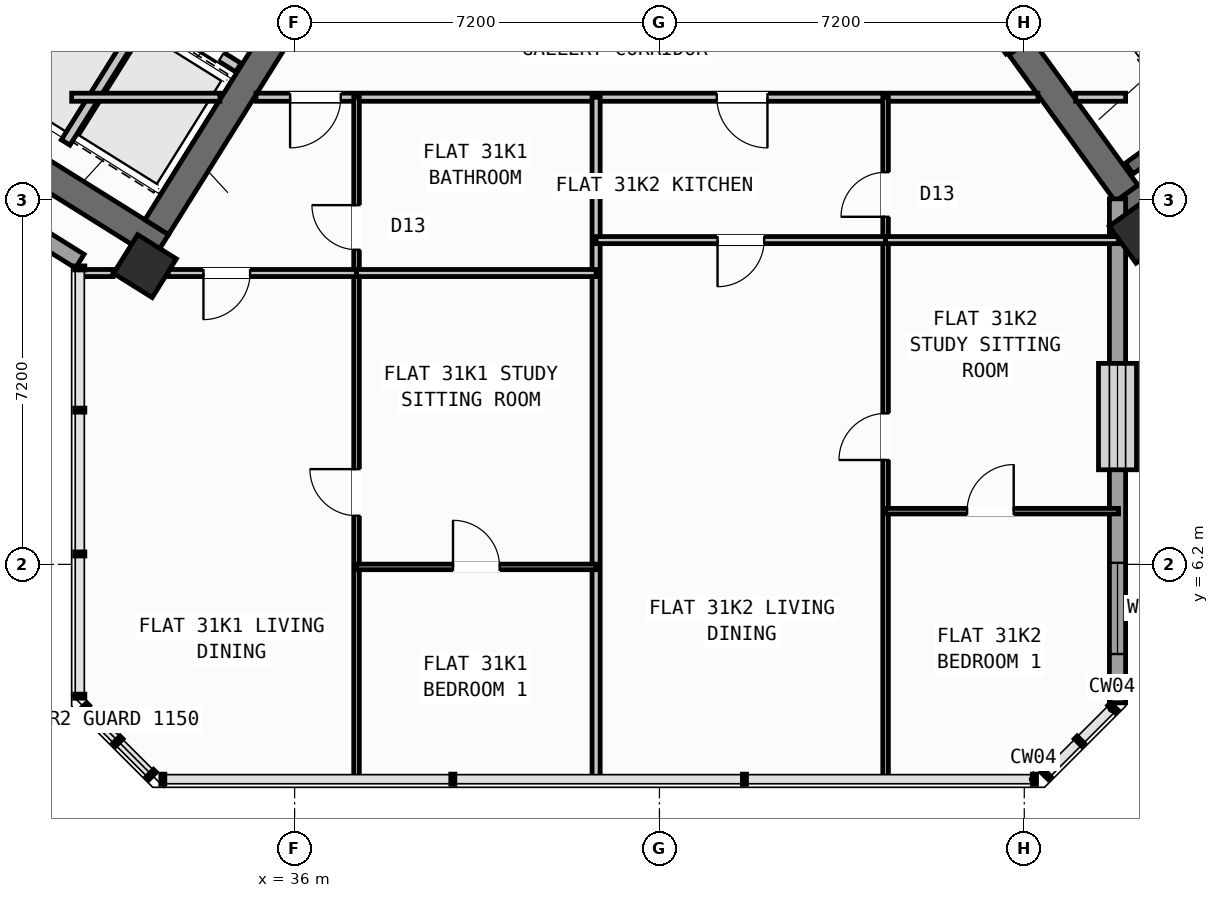
"""IFC4 building model, lengths in metres.
Left out: names, types, materials, properties, quantities, classifications, styles, units other than length and angle.
Written with IfcOpenShell. Run it as: python <this file> out.ifc"""

import sys

from ifc_helpers import new_model, si_unit, direction, frame, frame_2d, origin, origin_2d, place, context, subcontext, project, spatial, rectangle, hollow_rectangle, extrude, source, transform, mapped, element, fill, save


model = new_model("IFC4")
c1 = context("Model", 3, precision=1e-05, world=origin(), true_north=direction((0.0, 1.0)))
c2 = subcontext(c1, "Body", "Model", "MODEL_VIEW")
j1 = project(units=[si_unit("LENGTHUNIT", "METRE"), si_unit("PLANEANGLEUNIT", "RADIAN")], contexts=[c1])
p1 = place(None, origin())
s1 = spatial("IfcSite", under=j1, at=p1, CompositionType="ELEMENT")
p2 = place(p1, origin())
s2 = spatial("IfcBuilding", under=s1, at=p2, CompositionType="ELEMENT")
p3 = place(p2, frame((0.0, 0.0, 123.3)))
s3 = spatial("IfcBuildingStorey", under=s2, at=p3, CompositionType="ELEMENT", Elevation=123.3)
p4 = place(p3, frame((33.366, 12.477, 0.0), z_axis=(0.0, 0.0, 1.0), x_axis=(-0.848047359947, 0.529920442413, 0.0)))
e1 = element("IfcWall", 1, at=p4, inside=s3, PredefinedType="SHEAR", context=c2, shape_type="SweptSolid", body=[
    extrude(rectangle(XDim=13.14, YDim=0.55, at=frame_2d((6.57, 0.0))), origin(), (0.0, 0.0, 1.0), 4.22),
])
p5 = place(p3, frame((36.683, 18.304, 0.0), z_axis=(0.0, 0.0, 1.0), x_axis=(-0.529896466841, -0.848062341122, 0.0)))
e2 = element("IfcWall", 2, at=p5, inside=s3, PredefinedType="SHEAR", context=c2, shape_type="SweptSolid", body=[
    extrude(rectangle(XDim=6.425, YDim=0.55, at=frame_2d((3.212, 0.0))), origin(), (0.0, 0.0, 1.0), 4.22),
])
p6 = place(p3, frame((52.359, 13.14, 0.0), z_axis=(0.0, 0.0, 1.0), x_axis=(0.809014896919, 0.587788139183, 0.0)))
e3 = element("IfcWall", 3, at=p6, inside=s3, PredefinedType="SHEAR", context=c2, shape_type="SweptSolid", body=[
    extrude(rectangle(XDim=12.34, YDim=0.55, at=frame_2d((6.17, 0.0))), origin(), (0.0, 0.0, 1.0), 4.22),
])
p7 = place(p3, frame((52.42, 13.524, 0.0), z_axis=(0.0, 0.0, 1.0), x_axis=(-0.587802113096, 0.809004744015, 0.0)))
e4 = element("IfcWall", 4, at=p7, inside=s3, PredefinedType="SHEAR", context=c2, shape_type="SweptSolid", body=[
    extrude(rectangle(XDim=3.575, YDim=0.55, at=frame_2d((1.788, 0.0))), origin(), (0.0, 0.0, 1.0), 4.22),
])
m1 = source(origin(), c2, "Body", "SweptSolid", [
    extrude(hollow_rectangle(XDim=0.9, YDim=0.9, WallThickness=0.036, at=origin_2d()), origin(), (0.0, 0.0, 1.0), 4.5),
])
for number, where, z_axis, x_axis in (
    (5, (33.046, 12.087, 0.0), (0.0, 0.0, 1.0), (-0.848, 0.53, 0.0)),
    (6, (52.705, 12.773, 0.0), (0.0, 0.0, 1.0), (0.809, 0.588, 0.0)),
):
    element("IfcColumn", number, at=place(p3, frame(where, z_axis=z_axis, x_axis=x_axis)), inside=s3, PredefinedType="COLUMN", context=c2, shape_type="MappedRepresentation", body=[
        mapped(m1, transform((0.0, 0.0, 0.0), scale=1.0)),
    ])
p8 = place(p3, frame((31.76, 12.183, 0.0), z_axis=(0.0, 0.0, 1.0), x_axis=(-0.848047074256, 0.529920899612, 0.0)))
e7 = element("IfcWall", 7, at=p8, inside=s3, PredefinedType="STANDARD", context=c2, shape_type="SweptSolid", body=[
    extrude(rectangle(XDim=30.652, YDim=0.32, at=frame_2d((15.326, 0.0))), origin(), (0.0, 0.0, 1.0), 4.22),
])
p9 = place(p8, frame((14.966, 0.0, 0.0)))
e8 = element("IfcOpeningElement", 8, at=p9, cuts=e7, PredefinedType="OPENING", context=c2, shape_type="SweptSolid", body=[
    extrude(rectangle(XDim=1.2, YDim=2.15, at=frame_2d((0.6, 1.075))), frame((0.0, 0.17, 0.0), z_axis=(0.0, -1.0, 0.0), x_axis=(1.0, 0.0, 0.0)), (0.0, 0.0, 1.0), 0.34),
])
p10 = place(p8, frame((1.871, 0.0, 0.8)))
e9 = element("IfcOpeningElement", 9, at=p10, cuts=e7, PredefinedType="OPENING", context=c2, shape_type="SweptSolid", body=[
    extrude(rectangle(XDim=2.1, YDim=1.55, at=frame_2d((1.05, 0.775))), frame((0.0, 0.17, 0.0), z_axis=(0.0, -1.0, 0.0), x_axis=(1.0, 0.0, 0.0)), (0.0, 0.0, 1.0), 0.34),
])
p11 = place(p8, frame((6.546, 0.0, 0.8)))
e10 = element("IfcOpeningElement", 10, at=p11, cuts=e7, PredefinedType="OPENING", context=c2, shape_type="SweptSolid", body=[
    extrude(rectangle(XDim=2.1, YDim=1.55, at=frame_2d((1.05, 0.775))), frame((0.0, 0.17, 0.0), z_axis=(0.0, -1.0, 0.0), x_axis=(1.0, 0.0, 0.0)), (0.0, 0.0, 1.0), 0.34),
])
p12 = place(p8, frame((20.508, 0.0, 0.85)))
e11 = element("IfcOpeningElement", 11, at=p12, cuts=e7, PredefinedType="OPENING", context=c2, shape_type="SweptSolid", body=[
    extrude(rectangle(XDim=1.5, YDim=1.5, at=frame_2d((0.75, 0.75))), frame((0.0, 0.17, 0.0), z_axis=(0.0, -1.0, 0.0), x_axis=(1.0, 0.0, 0.0)), (0.0, 0.0, 1.0), 0.34),
])
p13 = place(p8, frame((27.253, 0.0, 0.95)))
e12 = element("IfcOpeningElement", 12, at=p13, cuts=e7, PredefinedType="OPENING", context=c2, shape_type="SweptSolid", body=[
    extrude(rectangle(XDim=1.2, YDim=1.4, at=frame_2d((0.6, 0.7))), frame((0.0, 0.17, 0.0), z_axis=(0.0, -1.0, 0.0), x_axis=(1.0, 0.0, 0.0)), (0.0, 0.0, 1.0), 0.34),
])
p14 = place(p3, frame((52.24, 13.414, 0.0), z_axis=(0.0, 0.0, 1.0), x_axis=(0.0, -1.0, 0.0)))
e13 = element("IfcWall", 13, at=p14, inside=s3, PredefinedType="STANDARD", context=c2, shape_type="SweptSolid", body=[
    extrude(rectangle(XDim=9.948, YDim=0.32, at=frame_2d((4.974, 0.0))), origin(), (0.0, 0.0, 1.0), 4.22),
])
p15 = place(p14, frame((3.247, 0.0, 0.8)))
e14 = element("IfcOpeningElement", 14, at=p15, cuts=e13, PredefinedType="OPENING", context=c2, shape_type="SweptSolid", body=[
    extrude(rectangle(XDim=2.1, YDim=1.55, at=frame_2d((1.05, 0.775))), frame((0.0, 0.17, 0.0), z_axis=(0.0, -1.0, 0.0), x_axis=(1.0, 0.0, 0.0)), (0.0, 0.0, 1.0), 0.34),
])
p16 = place(p14, frame((7.183, 0.0, 0.85)))
e15 = element("IfcOpeningElement", 15, at=p16, cuts=e13, PredefinedType="OPENING", context=c2, shape_type="SweptSolid", body=[
    extrude(rectangle(XDim=1.8, YDim=1.5, at=frame_2d((0.9, 0.75))), frame((0.0, 0.17, 0.0), z_axis=(0.0, -1.0, 0.0), x_axis=(1.0, 0.0, 0.0)), (0.0, 0.0, 1.0), 0.34),
])
p17 = place(p3, frame((31.288, 18.256, 0.0), z_axis=(0.0, 0.0, 1.0), x_axis=(-0.529943379326, -0.848033026897, 0.0)))
e16 = element("IfcWall", 16, at=p17, inside=s3, PredefinedType="SHEAR", context=c2, shape_type="SweptSolid", body=[
    extrude(rectangle(XDim=3.16, YDim=0.26, at=frame_2d((1.58, 0.0))), origin(), (0.0, 0.0, 1.0), 4.22),
])
p18 = place(p3, frame((34.891, 16.005, 0.0), z_axis=(0.0, 0.0, 1.0), x_axis=(-0.848062873452, 0.529895614884, 0.0)))
e17 = element("IfcWall", 17, at=p18, inside=s3, PredefinedType="STANDARD", context=c2, shape_type="SweptSolid", body=[
    extrude(rectangle(XDim=4.248, YDim=0.2, at=frame_2d((2.124, 0.0))), origin(), (0.0, 0.0, 1.0), 4.21),
])
p19 = place(p18, frame((0.398, 0.0, 0.0)))
e18 = element("IfcOpeningElement", 18, at=p19, cuts=e17, PredefinedType="OPENING", context=c2, shape_type="SweptSolid", body=[
    extrude(rectangle(XDim=1.3, YDim=2.2, at=frame_2d((0.65, 1.1))), frame((0.0, 0.11, 0.0), z_axis=(0.0, -1.0, 0.0), x_axis=(1.0, 0.0, 0.0)), (0.0, 0.0, 1.0), 0.22),
])
p20 = place(p18, frame((2.473, 0.0, 0.0)))
e19 = element("IfcOpeningElement", 19, at=p20, cuts=e17, PredefinedType="OPENING", context=c2, shape_type="SweptSolid", body=[
    extrude(rectangle(XDim=1.45, YDim=2.25, at=frame_2d((0.725, 1.125))), frame((0.0, 0.11, 0.0), z_axis=(0.0, -1.0, 0.0), x_axis=(1.0, 0.0, 0.0)), (0.0, 0.0, 1.0), 0.22),
])
p21 = place(p3, frame((33.029, 17.003, 0.0), z_axis=(0.0, 0.0, 1.0), x_axis=(-0.529916267533, -0.848049968695, 0.0)))
e20 = element("IfcWall", 20, at=p21, inside=s3, PredefinedType="STANDARD", context=c2, shape_type="SweptSolid", body=[
    extrude(rectangle(XDim=2.92, YDim=0.2, at=frame_2d((1.46, 0.0))), origin(), (0.0, 0.0, 1.0), 4.21),
])
p22 = place(p3, frame((52.472, 14.013, 0.0), z_axis=(0.0, 0.0, 1.0), x_axis=(0.809028366311, 0.587769599847, 0.0)))
e21 = element("IfcWall", 21, at=p22, inside=s3, PredefinedType="SHEAR", context=c2, shape_type="SweptSolid", body=[
    extrude(rectangle(XDim=7.33, YDim=0.26, at=frame_2d((3.665, 0.0))), origin(), (0.0, 0.0, 1.0), 4.22),
])
p23 = place(p3, frame((31.6, 15.42, 0.0), z_axis=(0.0, 0.0, 1.0), x_axis=(1.0, 0.0, 0.0)))
e22 = element("IfcWall", 22, at=p23, inside=s3, PredefinedType="PARTITIONING", context=c2, shape_type="SweptSolid", body=[
    extrude(rectangle(XDim=2.925, YDim=0.16, at=frame_2d((1.462, 0.0))), origin(), (0.0, 0.0, 1.0), 4.21),
])
p24 = place(p3, frame((35.237, 15.42, 0.0), z_axis=(0.0, 0.0, 1.0), x_axis=(1.0, 0.0, 0.0)))
e23 = element("IfcWall", 23, at=p24, inside=s3, PredefinedType="PARTITIONING", context=c2, shape_type="SweptSolid", body=[
    extrude(rectangle(XDim=15.432, YDim=0.16, at=frame_2d((7.716, 0.0))), origin(), (0.0, 0.0, 1.0), 4.21),
])
p25 = place(p24, frame((0.674, 0.0, 0.0)))
e24 = element("IfcOpeningElement", 24, at=p25, cuts=e23, PredefinedType="OPENING", context=c2, shape_type="SweptSolid", body=[
    extrude(rectangle(XDim=1.0, YDim=2.1, at=frame_2d((0.5, 1.05))), frame((0.0, 0.09, 0.0), z_axis=(0.0, -1.0, 0.0), x_axis=(1.0, 0.0, 0.0)), (0.0, 0.0, 1.0), 0.18),
])
p26 = place(p24, frame((9.094, 0.0, 0.0)))
e25 = element("IfcOpeningElement", 25, at=p26, cuts=e23, PredefinedType="OPENING", context=c2, shape_type="SweptSolid", body=[
    extrude(rectangle(XDim=1.0, YDim=2.1, at=frame_2d((0.5, 1.05))), frame((0.0, 0.09, 0.0), z_axis=(0.0, -1.0, 0.0), x_axis=(1.0, 0.0, 0.0)), (0.0, 0.0, 1.0), 0.18),
])
p27 = place(p3, frame((51.416, 15.42, 0.0), z_axis=(0.0, 0.0, 1.0), x_axis=(1.0, 0.0, 0.0)))
e26 = element("IfcWall", 26, at=p27, inside=s3, PredefinedType="PARTITIONING", context=c2, shape_type="SweptSolid", body=[
    extrude(rectangle(XDim=0.984, YDim=0.16, at=frame_2d((0.492, 0.0))), origin(), (0.0, 0.0, 1.0), 4.21),
])
p28 = place(p3, frame((50.119, 16.333, 0.0), z_axis=(0.0, 0.0, 1.0), x_axis=(-0.587749856981, 0.809042709391, 0.0)))
e27 = element("IfcWall", 27, at=p28, inside=s3, PredefinedType="STANDARD", context=c2, shape_type="SweptSolid", body=[
    extrude(rectangle(XDim=2.96, YDim=0.2, at=frame_2d((1.48, 0.0))), origin(), (0.0, 0.0, 1.0), 2.395),
])
p29 = place(p28, frame((0.53, 0.0, 0.0)))
e28 = element("IfcOpeningElement", 28, at=p29, cuts=e27, PredefinedType="OPENING", context=c2, shape_type="SweptSolid", body=[
    extrude(rectangle(XDim=1.5, YDim=2.15, at=frame_2d((0.75, 1.075))), frame((0.0, 0.11, 0.0), z_axis=(0.0, -1.0, 0.0), x_axis=(1.0, 0.0, 0.0)), (0.0, 0.0, 1.0), 0.22),
])
p30 = place(p3, frame((41.95, 1.96, 0.0), z_axis=(0.0, 0.0, 1.0), x_axis=(0.0, 1.0, 0.0)))
e29 = element("IfcWall", 29, at=p30, inside=s3, PredefinedType="PARTITIONING", context=c2, shape_type="SweptSolid", body=[
    extrude(rectangle(XDim=13.46, YDim=0.16, at=frame_2d((6.73, 0.0))), origin(), (0.0, 0.0, 1.0), 4.21),
])
p31 = place(p3, frame((37.222, 1.96, 0.0), z_axis=(0.0, 0.0, 1.0), x_axis=(0.0, 1.0, 0.0)))
e30 = element("IfcWall", 30, at=p31, inside=s3, PredefinedType="PARTITIONING", context=c2, shape_type="SweptSolid", body=[
    extrude(rectangle(XDim=13.46, YDim=0.11, at=frame_2d((6.73, 0.0))), origin(), (0.0, 0.0, 1.0), 4.21),
])
p32 = place(p31, frame((5.2, 0.0, 0.0)))
e31 = element("IfcOpeningElement", 31, at=p32, cuts=e30, PredefinedType="OPENING", context=c2, shape_type="SweptSolid", body=[
    extrude(rectangle(XDim=0.92, YDim=2.08, at=frame_2d((0.46, 1.04))), frame((0.0, 0.065, 0.0), z_axis=(0.0, -1.0, 0.0), x_axis=(1.0, 0.0, 0.0)), (0.0, 0.0, 1.0), 0.13),
])
p33 = place(p31, frame((10.45, 0.0, 0.0)))
e32 = element("IfcOpeningElement", 32, at=p33, cuts=e30, PredefinedType="OPENING", context=c2, shape_type="SweptSolid", body=[
    extrude(rectangle(XDim=0.88, YDim=2.08, at=frame_2d((0.44, 1.04))), frame((0.0, 0.065, 0.0), z_axis=(0.0, -1.0, 0.0), x_axis=(1.0, 0.0, 0.0)), (0.0, 0.0, 1.0), 0.13),
])
p34 = place(p3, frame((31.74, 11.95, 0.0), z_axis=(0.0, 0.0, 1.0), x_axis=(1.0, 0.0, 0.0)))
e33 = element("IfcWall", 33, at=p34, inside=s3, PredefinedType="PLUMBINGWALL", context=c2, shape_type="SweptSolid", body=[
    extrude(rectangle(XDim=0.676, YDim=0.14, at=frame_2d((0.338, 0.0))), origin(), (0.0, 0.0, 1.0), 4.21),
])
p35 = place(p3, frame((33.505, 11.95, 0.0), z_axis=(0.0, 0.0, 1.0), x_axis=(1.0, 0.0, 0.0)))
e34 = element("IfcWall", 34, at=p35, inside=s3, PredefinedType="PLUMBINGWALL", context=c2, shape_type="SweptSolid", body=[
    extrude(rectangle(XDim=3.717, YDim=0.14, at=frame_2d((1.858, 0.0))), origin(), (0.0, 0.0, 1.0), 4.21),
])
p36 = place(p35, frame((0.696, 0.0, 0.0)))
e35 = element("IfcOpeningElement", 35, at=p36, cuts=e34, PredefinedType="OPENING", context=c2, shape_type="SweptSolid", body=[
    extrude(rectangle(XDim=0.92, YDim=2.08, at=frame_2d((0.46, 1.04))), frame((0.0, 0.08, 0.0), z_axis=(0.0, -1.0, 0.0), x_axis=(1.0, 0.0, 0.0)), (0.0, 0.0, 1.0), 0.16),
])
p37 = place(p3, frame((37.222, 11.95, 0.0), z_axis=(0.0, 0.0, 1.0), x_axis=(1.0, 0.0, 0.0)))
e36 = element("IfcWall", 36, at=p37, inside=s3, PredefinedType="PLUMBINGWALL", context=c2, shape_type="SweptSolid", body=[
    extrude(rectangle(XDim=4.728, YDim=0.14, at=frame_2d((2.364, 0.0))), origin(), (0.0, 0.0, 1.0), 4.21),
])
p38 = place(p3, frame((37.222, 6.15, 0.0), z_axis=(0.0, 0.0, 1.0), x_axis=(1.0, 0.0, 0.0)))
e37 = element("IfcWall", 37, at=p38, inside=s3, PredefinedType="PARTITIONING", context=c2, shape_type="SweptSolid", body=[
    extrude(rectangle(XDim=4.728, YDim=0.11, at=frame_2d((2.364, 0.0))), origin(), (0.0, 0.0, 1.0), 4.21),
])
p39 = place(p38, frame((1.904, 0.0, 0.0)))
e38 = element("IfcOpeningElement", 38, at=p39, cuts=e37, PredefinedType="OPENING", context=c2, shape_type="SweptSolid", body=[
    extrude(rectangle(XDim=0.92, YDim=2.08, at=frame_2d((0.46, 1.04))), frame((0.0, 0.065, 0.0), z_axis=(0.0, -1.0, 0.0), x_axis=(1.0, 0.0, 0.0)), (0.0, 0.0, 1.0), 0.13),
])
p40 = place(p3, frame((47.663, 1.96, 0.0), z_axis=(0.0, 0.0, 1.0), x_axis=(0.0, 1.0, 0.0)))
e39 = element("IfcWall", 39, at=p40, inside=s3, PredefinedType="PARTITIONING", context=c2, shape_type="SweptSolid", body=[
    extrude(rectangle(XDim=13.46, YDim=0.11, at=frame_2d((6.73, 0.0))), origin(), (0.0, 0.0, 1.0), 4.21),
])
p41 = place(p40, frame((6.3, 0.0, 0.0)))
e40 = element("IfcOpeningElement", 40, at=p41, cuts=e39, PredefinedType="OPENING", context=c2, shape_type="SweptSolid", body=[
    extrude(rectangle(XDim=0.92, YDim=2.08, at=frame_2d((0.46, 1.04))), frame((0.0, 0.065, 0.0), z_axis=(0.0, -1.0, 0.0), x_axis=(1.0, 0.0, 0.0)), (0.0, 0.0, 1.0), 0.13),
])
p42 = place(p40, frame((11.1, 0.0, 0.0)))
e41 = element("IfcOpeningElement", 41, at=p42, cuts=e39, PredefinedType="OPENING", context=c2, shape_type="SweptSolid", body=[
    extrude(rectangle(XDim=0.88, YDim=2.08, at=frame_2d((0.44, 1.04))), frame((0.0, 0.065, 0.0), z_axis=(0.0, -1.0, 0.0), x_axis=(1.0, 0.0, 0.0)), (0.0, 0.0, 1.0), 0.13),
])
p43 = place(p3, frame((41.95, 12.6, 0.0), z_axis=(0.0, 0.0, 1.0), x_axis=(1.0, 0.0, 0.0)))
e42 = element("IfcWall", 42, at=p43, inside=s3, PredefinedType="PLUMBINGWALL", context=c2, shape_type="SweptSolid", body=[
    extrude(rectangle(XDim=5.713, YDim=0.14, at=frame_2d((2.856, 0.0))), origin(), (0.0, 0.0, 1.0), 4.21),
])
p44 = place(p43, frame((2.396, 0.0, 0.0)))
e43 = element("IfcOpeningElement", 43, at=p44, cuts=e42, PredefinedType="OPENING", context=c2, shape_type="SweptSolid", body=[
    extrude(rectangle(XDim=0.92, YDim=2.08, at=frame_2d((0.46, 1.04))), frame((0.0, 0.08, 0.0), z_axis=(0.0, -1.0, 0.0), x_axis=(1.0, 0.0, 0.0)), (0.0, 0.0, 1.0), 0.16),
])
p45 = place(p3, frame((47.663, 12.6, 0.0), z_axis=(0.0, 0.0, 1.0), x_axis=(1.0, 0.0, 0.0)))
e44 = element("IfcWall", 44, at=p45, inside=s3, PredefinedType="PLUMBINGWALL", context=c2, shape_type="SweptSolid", body=[
    extrude(rectangle(XDim=4.597, YDim=0.14, at=frame_2d((2.298, 0.0))), origin(), (0.0, 0.0, 1.0), 4.21),
])
p46 = place(p3, frame((47.663, 7.25, 0.0), z_axis=(0.0, 0.0, 1.0), x_axis=(1.0, 0.0, 0.0)))
e45 = element("IfcWall", 45, at=p46, inside=s3, PredefinedType="PARTITIONING", context=c2, shape_type="SweptSolid", body=[
    extrude(rectangle(XDim=4.597, YDim=0.11, at=frame_2d((2.298, 0.0))), origin(), (0.0, 0.0, 1.0), 4.21),
])
p47 = place(p46, frame((1.608, 0.0, 0.0)))
e46 = element("IfcOpeningElement", 46, at=p47, cuts=e45, PredefinedType="OPENING", context=c2, shape_type="SweptSolid", body=[
    extrude(rectangle(XDim=0.92, YDim=2.08, at=frame_2d((0.46, 1.04))), frame((0.0, 0.065, 0.0), z_axis=(0.0, -1.0, 0.0), x_axis=(1.0, 0.0, 0.0)), (0.0, 0.0, 1.0), 0.13),
])
m2 = source(origin(), c2, "Body", "SweptSolid", [
    extrude(rectangle(XDim=2.1, YDim=1.55, at=frame_2d((1.05, 0.775))), frame((0.0, 0.03, 0.0), z_axis=(0.0, -1.0, 0.0), x_axis=(1.0, 0.0, 0.0)), (0.0, 0.0, 1.0), 0.06),
])
p48 = place(p15, origin())
e47 = element("IfcWindow", 47, at=p48, inside=s3, PartitioningType="SINGLE_PANEL", PredefinedType="WINDOW", context=c2, shape_type="MappedRepresentation", body=[
    mapped(m2, transform((0.0, 0.0, 0.0), scale=1.0)),
])
fill(e14, e47)
m3 = source(origin(), c2, "Body", "SweptSolid", [
    extrude(rectangle(XDim=1.8, YDim=1.5, at=frame_2d((0.9, 0.75))), frame((0.0, 0.03, 0.0), z_axis=(0.0, -1.0, 0.0), x_axis=(1.0, 0.0, 0.0)), (0.0, 0.0, 1.0), 0.06),
])
p49 = place(p16, origin())
e48 = element("IfcWindow", 48, at=p49, inside=s3, PartitioningType="SINGLE_PANEL", PredefinedType="WINDOW", context=c2, shape_type="MappedRepresentation", body=[
    mapped(m3, transform((0.0, 0.0, 0.0), scale=1.0)),
])
fill(e15, e48)
m4 = source(origin(), c2, "Body", "SweptSolid", [
    extrude(rectangle(XDim=1.3, YDim=2.2, at=frame_2d((0.65, 1.1))), frame((0.0, 0.025, 0.0), z_axis=(0.0, -1.0, 0.0), x_axis=(1.0, 0.0, 0.0)), (0.0, 0.0, 1.0), 0.05),
])
p50 = place(p19, origin())
e49 = element("IfcDoor", 49, at=p50, inside=s3, OperationType="DOUBLE_DOOR_SLIDING", PredefinedType="DOOR", context=c2, shape_type="MappedRepresentation", body=[
    mapped(m4, transform((0.0, 0.0, 0.0), scale=1.0)),
])
fill(e18, e49)
m5 = source(origin(), c2, "Body", "SweptSolid", [
    extrude(rectangle(XDim=0.92, YDim=2.08, at=frame_2d((0.46, 1.04))), frame((0.0, 0.025, 0.0), z_axis=(0.0, -1.0, 0.0), x_axis=(1.0, 0.0, 0.0)), (0.0, 0.0, 1.0), 0.05),
])
p51 = place(p32, origin())
e50 = element("IfcDoor", 50, at=p51, inside=s3, OperationType="SINGLE_SWING_RIGHT", PredefinedType="DOOR", context=c2, shape_type="MappedRepresentation", body=[
    mapped(m5, transform((0.0, 0.0, 0.0), scale=1.0)),
])
fill(e31, e50)
p52 = place(p39, origin())
e51 = element("IfcDoor", 51, at=p52, inside=s3, OperationType="SINGLE_SWING_LEFT", PredefinedType="DOOR", context=c2, shape_type="MappedRepresentation", body=[
    mapped(m5, transform((0.0, 0.0, 0.0), scale=1.0)),
])
fill(e38, e51)
m6 = source(origin(), c2, "Body", "SweptSolid", [
    extrude(rectangle(XDim=1.0, YDim=2.1, at=frame_2d((0.5, 1.05))), frame((0.0, 0.025, 0.0), z_axis=(0.0, -1.0, 0.0), x_axis=(1.0, 0.0, 0.0)), (0.0, 0.0, 1.0), 0.05),
])
p53 = place(p25, frame((1.0, 0.0, 0.0), z_axis=(0.0, 0.0, 1.0), x_axis=(-1.0, 0.0, 0.0)))
e52 = element("IfcDoor", 52, at=p53, inside=s3, OperationType="SINGLE_SWING_RIGHT", PredefinedType="DOOR", context=c2, shape_type="MappedRepresentation", body=[
    mapped(m6, transform((0.0, 0.0, 0.0), scale=1.0)),
])
fill(e24, e52)
p54 = place(p36, frame((0.92, 0.0, 0.0), z_axis=(0.0, 0.0, 1.0), x_axis=(-1.0, 0.0, 0.0)))
e53 = element("IfcDoor", 53, at=p54, inside=s3, OperationType="SINGLE_SWING_RIGHT", PredefinedType="DOOR", context=c2, shape_type="MappedRepresentation", body=[
    mapped(m5, transform((0.0, 0.0, 0.0), scale=1.0)),
])
fill(e35, e53)
m7 = source(origin(), c2, "Body", "SweptSolid", [
    extrude(rectangle(XDim=0.88, YDim=2.08, at=frame_2d((0.44, 1.04))), frame((0.0, 0.025, 0.0), z_axis=(0.0, -1.0, 0.0), x_axis=(1.0, 0.0, 0.0)), (0.0, 0.0, 1.0), 0.05),
])
p55 = place(p33, origin())
e54 = element("IfcDoor", 54, at=p55, inside=s3, OperationType="SINGLE_SWING_RIGHT", PredefinedType="DOOR", context=c2, shape_type="MappedRepresentation", body=[
    mapped(m7, transform((0.0, 0.0, 0.0), scale=1.0)),
])
fill(e32, e54)
p56 = place(p41, origin())
e55 = element("IfcDoor", 55, at=p56, inside=s3, OperationType="SINGLE_SWING_LEFT", PredefinedType="DOOR", context=c2, shape_type="MappedRepresentation", body=[
    mapped(m5, transform((0.0, 0.0, 0.0), scale=1.0)),
])
fill(e40, e55)
p57 = place(p47, origin())
e56 = element("IfcDoor", 56, at=p57, inside=s3, OperationType="SINGLE_SWING_RIGHT", PredefinedType="DOOR", context=c2, shape_type="MappedRepresentation", body=[
    mapped(m5, transform((0.0, 0.0, 0.0), scale=1.0)),
])
fill(e46, e56)
p58 = place(p26, frame((1.0, 0.0, 0.0), z_axis=(0.0, 0.0, 1.0), x_axis=(-1.0, 0.0, 0.0)))
e57 = element("IfcDoor", 57, at=p58, inside=s3, OperationType="SINGLE_SWING_LEFT", PredefinedType="DOOR", context=c2, shape_type="MappedRepresentation", body=[
    mapped(m6, transform((0.0, 0.0, 0.0), scale=1.0)),
])
fill(e25, e57)
p59 = place(p44, frame((0.92, 0.0, 0.0), z_axis=(0.0, 0.0, 1.0), x_axis=(-1.0, 0.0, 0.0)))
e58 = element("IfcDoor", 58, at=p59, inside=s3, OperationType="SINGLE_SWING_RIGHT", PredefinedType="DOOR", context=c2, shape_type="MappedRepresentation", body=[
    mapped(m5, transform((0.0, 0.0, 0.0), scale=1.0)),
])
fill(e43, e58)
p60 = place(p42, origin())
e59 = element("IfcDoor", 59, at=p60, inside=s3, OperationType="SINGLE_SWING_LEFT", PredefinedType="DOOR", context=c2, shape_type="MappedRepresentation", body=[
    mapped(m7, transform((0.0, 0.0, 0.0), scale=1.0)),
])
fill(e41, e59)
save(model, sys.argv[1])
